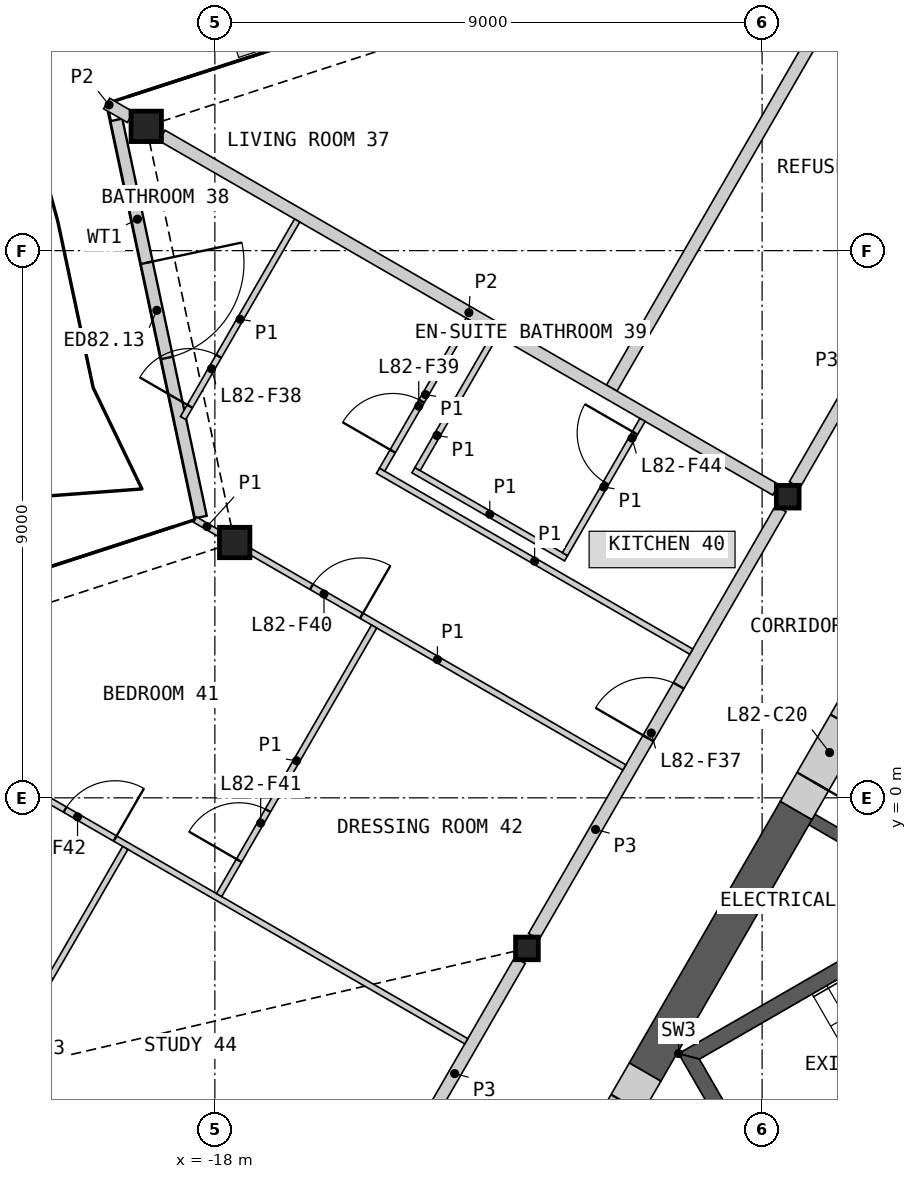
"""IFC4 building model, lengths in metres.
Left out: names, types, materials, properties, quantities, classifications, styles, units other than length and angle.
Written with IfcOpenShell. Run it as: python <this file> out.ifc"""

import sys

from ifc_helpers import new_model, si_unit, direction, frame, frame_2d, origin, origin_2d, place, context, subcontext, project, spatial, polyline, rectangle, hollow_rectangle, i_section, outline, extrude, element, fill, save


model = new_model("IFC4")
c1 = context("Model", 3, precision=1e-05, world=origin(), true_north=direction((0.0, 1.0)))
c2 = subcontext(c1, "Body", "Model", "MODEL_VIEW")
j1 = project(units=[si_unit("LENGTHUNIT", "METRE"), si_unit("PLANEANGLEUNIT", "RADIAN")], contexts=[c1])
p1 = place(None, origin())
s1 = spatial("IfcSite", under=j1, at=p1, CompositionType="ELEMENT")
p2 = place(p1, origin())
s2 = spatial("IfcBuilding", under=s1, at=p2, CompositionType="ELEMENT")
p3 = place(p2, frame((0.0, 0.0, 367.8)))
s3 = spatial("IfcBuildingStorey", under=s2, at=p3, CompositionType="ELEMENT", Elevation=367.8)
for number, where, z_axis, x_axis in (
    (1, (-19.129, 11.044, 0.0), (0.0, 0.0, 1.0), (1.0, 0.0, 0.0)),
    (2, (-17.674, 4.199, 0.0), (0.0, 0.0, 1.0), (1.0, 0.0, 0.0)),
):
    element("IfcColumn", number, at=place(p3, frame(where, z_axis=z_axis, x_axis=x_axis)), inside=s3, PredefinedType="COLUMN", context=c2, shape_type="SweptSolid", body=[
        extrude(hollow_rectangle(XDim=0.5, YDim=0.5, WallThickness=0.03, at=origin_2d()), origin(), (0.0, 0.0, 1.0), 3.4),
    ])
for number, where, z_axis, x_axis in (
    (3, (-8.578, 4.953, 0.0), (0.0, 0.0, 1.0), (1.0, 0.0, 0.0)),
    (4, (-12.868, -2.476, 0.0), (0.0, 0.0, 1.0), (1.0, 0.0, 0.0)),
):
    element("IfcColumn", number, at=place(p3, frame(where, z_axis=z_axis, x_axis=x_axis)), inside=s3, PredefinedType="COLUMN", context=c2, shape_type="SweptSolid", body=[
        extrude(i_section(OverallWidth=0.374, OverallDepth=0.372, WebThickness=0.016, FlangeThickness=0.026, at=origin_2d()), origin(), (0.0, 0.0, 1.0), 3.4),
    ])
p4 = place(p3, frame((-19.62, 11.15, 0.0), z_axis=(0.0, 0.0, 1.0), x_axis=(0.207933518746, -0.97814296081, 0.0)))
e5 = element("IfcWall", 5, at=p4, inside=s3, PredefinedType="SOLIDWALL", context=c2, shape_type="SweptSolid", body=[
    extrude(rectangle(XDim=6.678, YDim=0.2, at=frame_2d((3.339, 0.0))), origin(), (0.0, 0.0, 1.0), 2.634),
])
p5 = place(p4, frame((2.402, 0.0, 0.0)))
e6 = element("IfcOpeningElement", 6, at=p5, cuts=e5, PredefinedType="OPENING", context=c2, shape_type="SweptSolid", body=[
    extrude(rectangle(XDim=1.6, YDim=2.25, at=frame_2d((0.8, 1.125))), frame((0.0, 0.11, 0.0), z_axis=(0.0, -1.0, 0.0), x_axis=(1.0, 0.0, 0.0)), (0.0, 0.0, 1.0), 0.22),
])
p6 = place(p3, origin())
e7 = element("IfcWall", 7, at=p6, inside=s3, PredefinedType="SHEAR", context=c2, shape_type="SweptSolid", body=[
    extrude(outline(polyline([(-6.061, -1.697), (-8.231, -0.444), (-8.131, -0.271), (-5.96, -1.524), (-6.061, -1.697)])), origin(), (0.0, 0.0, 1.0), 3.1),
])
p7 = place(p3, origin())
e8 = element("IfcWall", 8, at=p7, inside=s3, PredefinedType="SHEAR", context=c2, shape_type="SweptSolid", body=[
    extrude(outline(polyline([(-5.307, -1.281), (-10.374, -4.206), (-10.032, -4.298), (-5.182, -1.498), (-5.307, -1.281)])), origin(), (0.0, 0.0, 1.0), 3.1),
])
p8 = place(p3, origin())
e9 = element("IfcWall", 9, at=p8, inside=s3, PredefinedType="SHEAR", context=c2, shape_type="SweptSolid", body=[
    extrude(outline(polyline([(-10.374, -4.206), (-8.83, -6.881), (-8.738, -6.539), (-10.032, -4.298), (-10.374, -4.206)])), origin(), (0.0, 0.0, 1.0), 3.1),
])
p9 = place(p3, origin())
e10 = element("IfcWall", 10, at=p9, inside=s3, PredefinedType="SHEAR", context=c2, shape_type="SweptSolid", body=[
    extrude(outline(polyline([(-8.738, -6.539), (-8.83, -6.881), (-3.763, -3.956), (-3.888, -3.739), (-8.738, -6.539)])), origin(), (0.0, 0.0, 1.0), 3.1),
])
p10 = place(p3, frame((-8.44, -0.208, 0.0), z_axis=(0.0, 0.0, 1.0), x_axis=(-0.500007425856, -0.866021116422, 0.0)))
e11 = element("IfcWall", 11, at=p10, inside=s3, PredefinedType="SHEAR", context=c2, shape_type="SweptSolid", body=[
    extrude(rectangle(XDim=4.969, YDim=0.6, at=frame_2d((2.484, 0.0))), origin(), (0.0, 0.0, 1.0), 3.1),
])
p11 = place(p3, frame((-10.925, -4.511, 0.0), z_axis=(0.0, 0.0, 1.0), x_axis=(-0.500018667571, -0.866014625789, 0.0)))
e12 = element("IfcWall", 12, at=p11, inside=s3, PredefinedType="SHEAR", context=c2, shape_type="SweptSolid", body=[
    extrude(rectangle(XDim=2.592, YDim=0.6, at=frame_2d((1.296, 0.0))), origin(), (0.0, 0.0, 1.0), 3.1),
])
p12 = place(p11, frame((0.6, 0.0, 0.0)))
e13 = element("IfcOpeningElement", 13, at=p12, cuts=e12, PredefinedType="OPENING", context=c2, shape_type="SweptSolid", body=[
    extrude(rectangle(XDim=1.0, YDim=2.1, at=frame_2d((0.5, 1.05))), frame((0.0, 0.31, 0.0), z_axis=(0.0, -1.0, 0.0), x_axis=(1.0, 0.0, 0.0)), (0.0, 0.0, 1.0), 0.62),
])
p13 = place(p3, frame((-7.34, 1.698, 0.0), z_axis=(0.0, 0.0, 1.0), x_axis=(-0.50002983664, -0.866008176907, 0.0)))
e14 = element("IfcWall", 14, at=p13, inside=s3, PredefinedType="SHEAR", context=c2, shape_type="SweptSolid", body=[
    extrude(rectangle(XDim=2.2, YDim=0.6, at=frame_2d((1.1, 0.0))), origin(), (0.0, 0.0, 1.0), 3.1),
])
p14 = place(p13, frame((0.55, 0.0, 0.0)))
e15 = element("IfcOpeningElement", 15, at=p14, cuts=e14, PredefinedType="OPENING", context=c2, shape_type="SweptSolid", body=[
    extrude(rectangle(XDim=1.1, YDim=2.1, at=frame_2d((0.55, 1.05))), frame((0.0, 0.31, 0.0), z_axis=(0.0, -1.0, 0.0), x_axis=(1.0, 0.0, 0.0)), (0.0, 0.0, 1.0), 0.62),
])
p15 = place(p3, frame((-8.465, 5.15, 0.0), z_axis=(0.0, 0.0, 1.0), x_axis=(0.499992155518, 0.866029932751, 0.0)))
e16 = element("IfcWall", 16, at=p15, inside=s3, PredefinedType="PARTITIONING", context=c2, shape_type="SweptSolid", body=[
    extrude(rectangle(XDim=8.123, YDim=0.2, at=frame_2d((4.062, 0.0))), origin(), (0.0, 0.0, 1.0), 3.1),
])
p16 = place(p15, frame((3.587, 0.0, 0.0)))
e17 = element("IfcOpeningElement", 17, at=p16, cuts=e16, PredefinedType="OPENING", context=c2, shape_type="SweptSolid", body=[
    extrude(rectangle(XDim=0.95, YDim=2.1, at=frame_2d((0.475, 1.05))), frame((0.0, 0.11, 0.0), z_axis=(0.0, -1.0, 0.0), x_axis=(1.0, 0.0, 0.0)), (0.0, 0.0, 1.0), 0.22),
])
p17 = place(p3, frame((-12.754, -2.279, 0.0), z_axis=(0.0, 0.0, 1.0), x_axis=(0.500001682468, 0.866024432409, 0.0)))
e18 = element("IfcWall", 18, at=p17, inside=s3, PredefinedType="PARTITIONING", context=c2, shape_type="SweptSolid", body=[
    extrude(rectangle(XDim=8.124, YDim=0.2, at=frame_2d((4.062, 0.0))), origin(), (0.0, 0.0, 1.0), 3.1),
])
p18 = place(p17, frame((3.762, 0.0, 0.0)))
e19 = element("IfcOpeningElement", 19, at=p18, cuts=e18, PredefinedType="OPENING", context=c2, shape_type="SweptSolid", body=[
    extrude(rectangle(XDim=1.0, YDim=2.1, at=frame_2d((0.5, 1.05))), frame((0.0, 0.11, 0.0), z_axis=(0.0, -1.0, 0.0), x_axis=(1.0, 0.0, 0.0)), (0.0, 0.0, 1.0), 0.22),
])
p19 = place(p3, frame((-15.131, -6.397, 0.0), z_axis=(0.0, 0.0, 1.0), x_axis=(0.499986217557, 0.866033360935, 0.0)))
e20 = element("IfcWall", 20, at=p19, inside=s3, PredefinedType="PARTITIONING", context=c2, shape_type="SweptSolid", body=[
    extrude(rectangle(XDim=4.3, YDim=0.2, at=frame_2d((2.15, 0.0))), origin(), (0.0, 0.0, 1.0), 3.1),
])
p20 = place(p3, frame((-11.473, 6.74, 0.0), z_axis=(0.0, 0.0, 1.0), x_axis=(0.499993542657, 0.866029131901, 0.0)))
e21 = element("IfcWall", 21, at=p20, inside=s3, PredefinedType="PARTITIONING", context=c2, shape_type="SweptSolid", body=[
    extrude(rectangle(XDim=14.994, YDim=0.2, at=frame_2d((7.497, 0.0))), origin(), (0.0, 0.0, 1.0), 2.33),
])
p21 = place(p20, frame((10.383, 0.0, 0.0)))
e22 = element("IfcOpeningElement", 22, at=p21, cuts=e21, PredefinedType="OPENING", context=c2, shape_type="SweptSolid", body=[
    extrude(rectangle(XDim=0.95, YDim=2.1, at=frame_2d((0.475, 1.05))), frame((0.0, 0.11, 0.0), z_axis=(0.0, -1.0, 0.0), x_axis=(1.0, 0.0, 0.0)), (0.0, 0.0, 1.0), 0.22),
])
p22 = place(p3, frame((-18.869, 10.894, 0.0), z_axis=(0.0, 0.0, 1.0), x_axis=(0.866023724155, -0.500002909193, 0.0)))
e23 = element("IfcWall", 23, at=p22, inside=s3, PredefinedType="PARTITIONING", context=c2, shape_type="SweptSolid", body=[
    extrude(rectangle(XDim=11.655, YDim=0.2, at=frame_2d((5.827, 0.0))), origin(), (0.0, 0.0, 1.0), 2.33),
])
p23 = place(p3, frame((-19.78, 11.42, 0.0), z_axis=(0.0, 0.0, 1.0), x_axis=(0.866104518135, -0.499862944882, 0.0)))
e24 = element("IfcWall", 24, at=p23, inside=s3, PredefinedType="PARTITIONING", context=c2, shape_type="SweptSolid", body=[
    extrude(rectangle(XDim=0.451, YDim=0.2, at=frame_2d((0.226, 0.0))), origin(), (0.0, 0.0, 1.0), 2.33),
])
p24 = place(p3, frame((-24.069, 1.887, 0.0), z_axis=(0.0, 0.0, 1.0), x_axis=(0.866023404247, -0.500003463284, 0.0)))
e25 = element("IfcWall", 25, at=p24, inside=s3, PredefinedType="PARTITIONING", context=c2, shape_type="SweptSolid", body=[
    extrude(rectangle(XDim=11.782, YDim=0.1, at=frame_2d((5.891, 0.0))), origin(), (0.0, 0.0, 1.0), 2.33),
])
p25 = place(p24, frame((4.162, 0.0, 0.0)))
e26 = element("IfcOpeningElement", 26, at=p25, cuts=e25, PredefinedType="OPENING", context=c2, shape_type="SweptSolid", body=[
    extrude(rectangle(XDim=0.95, YDim=2.1, at=frame_2d((0.475, 1.05))), frame((0.0, 0.06, 0.0), z_axis=(0.0, -1.0, 0.0), x_axis=(1.0, 0.0, 0.0)), (0.0, 0.0, 1.0), 0.12),
])
p26 = place(p3, frame((-17.414, 4.049, 0.0), z_axis=(0.0, 0.0, 1.0), x_axis=(0.866033839264, -0.499985389037, 0.0)))
e27 = element("IfcWall", 27, at=p26, inside=s3, PredefinedType="PARTITIONING", context=c2, shape_type="SweptSolid", body=[
    extrude(rectangle(XDim=7.1, YDim=0.1, at=frame_2d((3.55, 0.0))), origin(), (0.0, 0.0, 1.0), 2.33),
])
p27 = place(p26, frame((1.158, 0.0, 0.0)))
e28 = element("IfcOpeningElement", 28, at=p27, cuts=e27, PredefinedType="OPENING", context=c2, shape_type="SweptSolid", body=[
    extrude(rectangle(XDim=0.95, YDim=2.1, at=frame_2d((0.475, 1.05))), frame((0.0, 0.06, 0.0), z_axis=(0.0, -1.0, 0.0), x_axis=(1.0, 0.0, 0.0)), (0.0, 0.0, 1.0), 0.12),
])
p28 = place(p3, frame((-22.71, -6.429, 0.0), z_axis=(0.0, 0.0, 1.0), x_axis=(0.499984737558, 0.86603421538, 0.0)))
e29 = element("IfcWall", 29, at=p28, inside=s3, PredefinedType="PARTITIONING", context=c2, shape_type="SweptSolid", body=[
    extrude(rectangle(XDim=6.473, YDim=0.1, at=frame_2d((3.236, 0.0))), origin(), (0.0, 0.0, 1.0), 2.33),
])
p29 = place(p28, frame((3.063, 0.0, 0.0)))
e30 = element("IfcOpeningElement", 30, at=p29, cuts=e29, PredefinedType="OPENING", context=c2, shape_type="SweptSolid", body=[
    extrude(rectangle(XDim=0.95, YDim=2.1, at=frame_2d((0.475, 1.05))), frame((0.0, 0.06, 0.0), z_axis=(0.0, -1.0, 0.0), x_axis=(1.0, 0.0, 0.0)), (0.0, 0.0, 1.0), 0.12),
])
p30 = place(p3, frame((-15.318, 5.38, 0.0), z_axis=(0.0, 0.0, 1.0), x_axis=(0.866035260786, -0.499982926783, 0.0)))
e31 = element("IfcWall", 31, at=p30, inside=s3, PredefinedType="PARTITIONING", context=c2, shape_type="SweptSolid", body=[
    extrude(rectangle(XDim=5.95, YDim=0.1, at=frame_2d((2.975, 0.0))), origin(), (0.0, 0.0, 1.0), 2.33),
])
p31 = place(p3, frame((-17.931, -1.599, 0.0), z_axis=(0.0, 0.0, 1.0), x_axis=(0.500005610874, 0.86602216432, 0.0)))
e32 = element("IfcWall", 32, at=p31, inside=s3, PredefinedType="PARTITIONING", context=c2, shape_type="SweptSolid", body=[
    extrude(rectangle(XDim=5.1, YDim=0.1, at=frame_2d((2.55, 0.0))), origin(), (0.0, 0.0, 1.0), 2.33),
])
p32 = place(p31, frame((0.656, 0.0, 0.0)))
e33 = element("IfcOpeningElement", 33, at=p32, cuts=e32, PredefinedType="OPENING", context=c2, shape_type="SweptSolid", body=[
    extrude(rectangle(XDim=0.95, YDim=2.1, at=frame_2d((0.475, 1.05))), frame((0.0, 0.06, 0.0), z_axis=(0.0, -1.0, 0.0), x_axis=(1.0, 0.0, 0.0)), (0.0, 0.0, 1.0), 0.12),
])
p33 = place(p3, frame((-18.523, 6.247, 0.0), z_axis=(0.0, 0.0, 1.0), x_axis=(0.499981580887, 0.866036037803, 0.0)))
e34 = element("IfcWall", 34, at=p33, inside=s3, PredefinedType="PARTITIONING", context=c2, shape_type="SweptSolid", body=[
    extrude(rectangle(XDim=3.752, YDim=0.1, at=frame_2d((1.876, 0.0))), origin(), (0.0, 0.0, 1.0), 2.33),
])
p34 = place(p33, frame((0.222, 0.0, 0.0)))
e35 = element("IfcOpeningElement", 35, at=p34, cuts=e34, PredefinedType="OPENING", context=c2, shape_type="SweptSolid", body=[
    extrude(rectangle(XDim=0.95, YDim=2.1, at=frame_2d((0.475, 1.05))), frame((0.0, 0.06, 0.0), z_axis=(0.0, -1.0, 0.0), x_axis=(1.0, 0.0, 0.0)), (0.0, 0.0, 1.0), 0.12),
])
p35 = place(p3, frame((-15.25, 5.398, 0.0), z_axis=(0.0, 0.0, 1.0), x_axis=(0.499935029643, 0.866062911188, 0.0)))
e36 = element("IfcWall", 36, at=p35, inside=s3, PredefinedType="PARTITIONING", context=c2, shape_type="SweptSolid", body=[
    extrude(rectangle(XDim=2.85, YDim=0.1, at=frame_2d((1.425, 0.0))), origin(), (0.0, 0.0, 1.0), 2.33),
])
p36 = place(p35, frame((0.35, 0.0, 0.0)))
e37 = element("IfcOpeningElement", 37, at=p36, cuts=e36, PredefinedType="OPENING", context=c2, shape_type="SweptSolid", body=[
    extrude(rectangle(XDim=0.95, YDim=2.1, at=frame_2d((0.475, 1.05))), frame((0.0, 0.06, 0.0), z_axis=(0.0, -1.0, 0.0), x_axis=(1.0, 0.0, 0.0)), (0.0, 0.0, 1.0), 0.12),
])
p37 = place(p3, frame((-14.735, 5.389, 0.0), z_axis=(0.0, 0.0, 1.0), x_axis=(0.866032775405, -0.499987231761, 0.0)))
e38 = element("IfcWall", 38, at=p37, inside=s3, PredefinedType="PARTITIONING", context=c2, shape_type="SweptSolid", body=[
    extrude(rectangle(XDim=2.9, YDim=0.1, at=frame_2d((1.45, 0.0))), origin(), (0.0, 0.0, 1.0), 2.33),
])
p38 = place(p3, frame((-12.242, 4.008, 0.0), z_axis=(0.0, 0.0, 1.0), x_axis=(0.499948979701, 0.866054858364, 0.0)))
e39 = element("IfcWall", 39, at=p38, inside=s3, PredefinedType="PARTITIONING", context=c2, shape_type="SweptSolid", body=[
    extrude(rectangle(XDim=2.55, YDim=0.1, at=frame_2d((1.275, 0.0))), origin(), (0.0, 0.0, 1.0), 2.33),
])
p39 = place(p38, frame((1.35, 0.0, 0.0)))
e40 = element("IfcOpeningElement", 40, at=p39, cuts=e39, PredefinedType="OPENING", context=c2, shape_type="SweptSolid", body=[
    extrude(rectangle(XDim=0.95, YDim=2.1, at=frame_2d((0.475, 1.05))), frame((0.0, 0.06, 0.0), z_axis=(0.0, -1.0, 0.0), x_axis=(1.0, 0.0, 0.0)), (0.0, 0.0, 1.0), 0.12),
])
p40 = place(p3, frame((-14.667, 5.408, 0.0), z_axis=(0.0, 0.0, 1.0), x_axis=(0.499948979701, 0.866054858364, 0.0)))
e41 = element("IfcWall", 41, at=p40, inside=s3, PredefinedType="PARTITIONING", context=c2, shape_type="SweptSolid", body=[
    extrude(rectangle(XDim=2.55, YDim=0.1, at=frame_2d((1.275, 0.0))), origin(), (0.0, 0.0, 1.0), 2.33),
])
p41 = place(p3, frame((-18.325, 4.575, 0.0), z_axis=(0.0, 0.0, 1.0), x_axis=(0.866104518135, -0.499862944882, 0.0)))
e42 = element("IfcWall", 42, at=p41, inside=s3, PredefinedType="PARTITIONING", context=c2, shape_type="SweptSolid", body=[
    extrude(rectangle(XDim=0.451, YDim=0.1, at=frame_2d((0.226, 0.0))), origin(), (0.0, 0.0, 1.0), 2.33),
])
p42 = place(p5, origin())
e43 = element("IfcDoor", 43, at=p42, inside=s3, OperationType="DOUBLE_DOOR_SINGLE_SWING", PredefinedType="DOOR", context=c2, shape_type="SweptSolid", body=[
    extrude(rectangle(XDim=1.6, YDim=2.25, at=frame_2d((0.8, 1.125))), frame((0.0, 0.025, 0.0), z_axis=(0.0, -1.0, 0.0), x_axis=(1.0, 0.0, 0.0)), (0.0, 0.0, 1.0), 0.05),
])
fill(e6, e43)
p43 = place(p14, origin())
e44 = element("IfcDoor", 44, at=p43, inside=s3, OperationType="SINGLE_SWING_RIGHT", PredefinedType="DOOR", context=c2, shape_type="SweptSolid", body=[
    extrude(rectangle(XDim=1.1, YDim=2.1, at=frame_2d((0.55, 1.05))), frame((0.0, 0.055, 0.0), z_axis=(0.0, -1.0, 0.0), x_axis=(1.0, 0.0, 0.0)), (0.0, 0.0, 1.0), 0.05),
])
fill(e15, e44)
p44 = place(p18, origin())
e45 = element("IfcDoor", 45, at=p44, inside=s3, OperationType="SINGLE_SWING_LEFT", PredefinedType="DOOR", context=c2, shape_type="SweptSolid", body=[
    extrude(rectangle(XDim=1.0, YDim=2.1, at=frame_2d((0.5, 1.05))), frame((0.0, 0.025, 0.0), z_axis=(0.0, -1.0, 0.0), x_axis=(1.0, 0.0, 0.0)), (0.0, 0.0, 1.0), 0.05),
])
fill(e19, e45)
p45 = place(p34, origin())
e46 = element("IfcDoor", 46, at=p45, inside=s3, OperationType="SINGLE_SWING_LEFT", PredefinedType="DOOR", context=c2, shape_type="SweptSolid", body=[
    extrude(rectangle(XDim=0.95, YDim=2.1, at=frame_2d((0.475, 1.05))), frame((0.0, 0.025, 0.0), z_axis=(0.0, -1.0, 0.0), x_axis=(1.0, 0.0, 0.0)), (0.0, 0.0, 1.0), 0.05),
])
fill(e35, e46)
p46 = place(p36, origin())
e47 = element("IfcDoor", 47, at=p46, inside=s3, OperationType="SINGLE_SWING_LEFT", PredefinedType="DOOR", context=c2, shape_type="SweptSolid", body=[
    extrude(rectangle(XDim=0.95, YDim=2.1, at=frame_2d((0.475, 1.05))), frame((0.0, 0.025, 0.0), z_axis=(0.0, -1.0, 0.0), x_axis=(1.0, 0.0, 0.0)), (0.0, 0.0, 1.0), 0.05),
])
fill(e37, e47)
p47 = place(p27, origin())
e48 = element("IfcDoor", 48, at=p47, inside=s3, OperationType="SINGLE_SWING_RIGHT", PredefinedType="DOOR", context=c2, shape_type="SweptSolid", body=[
    extrude(rectangle(XDim=0.95, YDim=2.1, at=frame_2d((0.475, 1.05))), frame((0.0, 0.025, 0.0), z_axis=(0.0, -1.0, 0.0), x_axis=(1.0, 0.0, 0.0)), (0.0, 0.0, 1.0), 0.05),
])
fill(e28, e48)
p48 = place(p32, origin())
e49 = element("IfcDoor", 49, at=p48, inside=s3, OperationType="SINGLE_SWING_LEFT", PredefinedType="DOOR", context=c2, shape_type="SweptSolid", body=[
    extrude(rectangle(XDim=0.95, YDim=2.1, at=frame_2d((0.475, 1.05))), frame((0.0, 0.025, 0.0), z_axis=(0.0, -1.0, 0.0), x_axis=(1.0, 0.0, 0.0)), (0.0, 0.0, 1.0), 0.05),
])
fill(e33, e49)
p49 = place(p25, origin())
e50 = element("IfcDoor", 50, at=p49, inside=s3, OperationType="SINGLE_SWING_RIGHT", PredefinedType="DOOR", context=c2, shape_type="SweptSolid", body=[
    extrude(rectangle(XDim=0.95, YDim=2.1, at=frame_2d((0.475, 1.05))), frame((0.0, 0.025, 0.0), z_axis=(0.0, -1.0, 0.0), x_axis=(1.0, 0.0, 0.0)), (0.0, 0.0, 1.0), 0.05),
])
fill(e26, e50)
p50 = place(p39, origin())
e51 = element("IfcDoor", 51, at=p50, inside=s3, OperationType="SINGLE_SWING_RIGHT", PredefinedType="DOOR", context=c2, shape_type="SweptSolid", body=[
    extrude(rectangle(XDim=0.95, YDim=2.1, at=frame_2d((0.475, 1.05))), frame((0.0, 0.025, 0.0), z_axis=(0.0, -1.0, 0.0), x_axis=(1.0, 0.0, 0.0)), (0.0, 0.0, 1.0), 0.05),
])
fill(e40, e51)
save(model, sys.argv[1])
